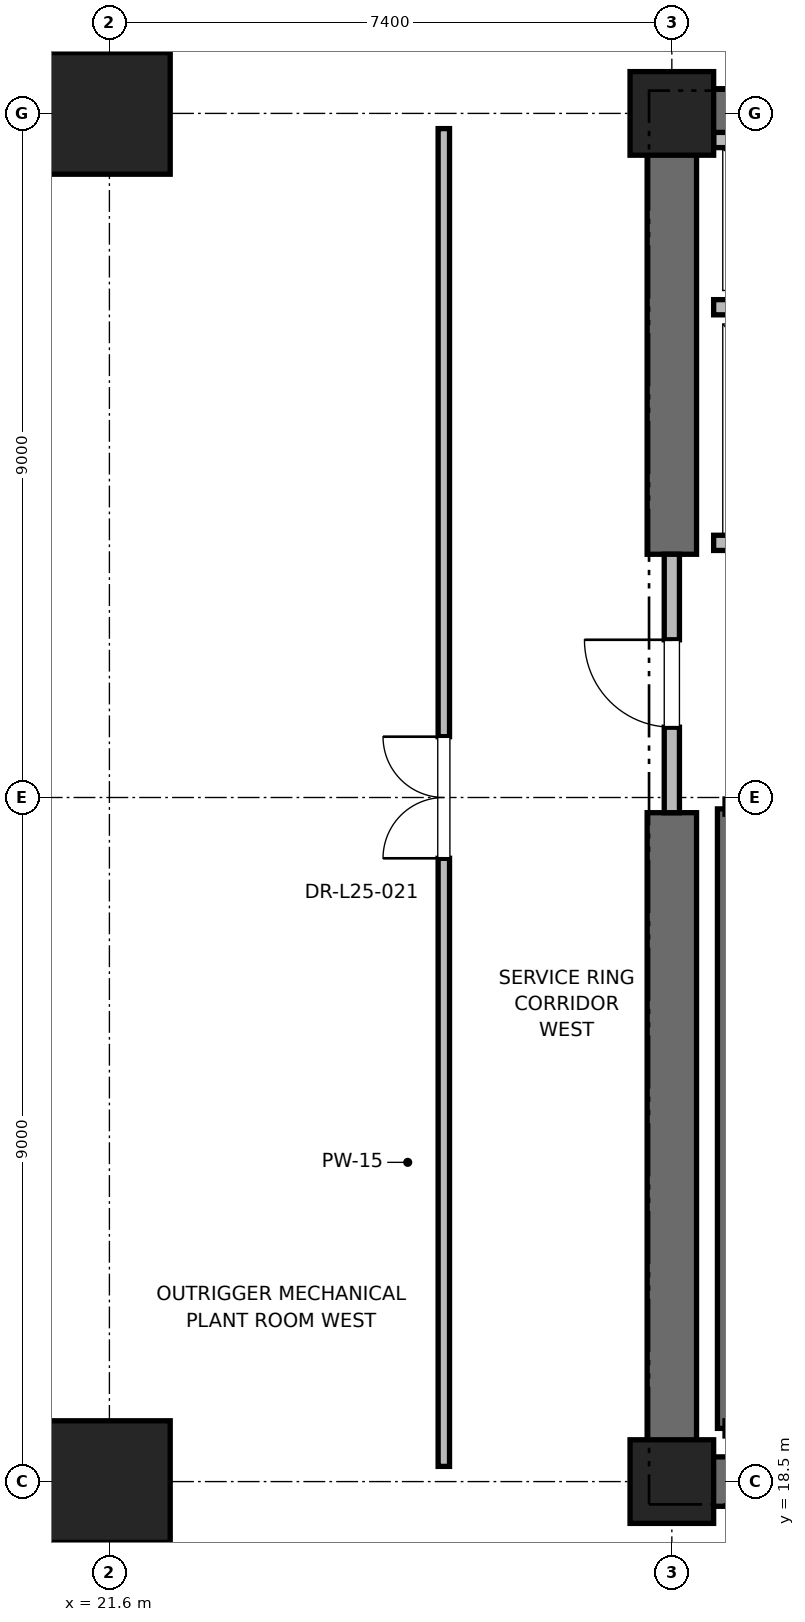
"""IFC4 building model, lengths in metres.
Left out: names, types, materials, properties, quantities, classifications, styles, units other than length and angle.
Written with IfcOpenShell. Run it as: python <this file> out.ifc"""

import sys

from ifc_helpers import new_model, si_unit, direction, frame, frame_2d, origin, origin_2d, place, context, subcontext, project, spatial, rectangle, extrude, element, fill, save


model = new_model("IFC4")
c1 = context("Model", 3, precision=1e-05, world=origin(), true_north=direction((0.0, 1.0)))
c2 = subcontext(c1, "Body", "Model", "MODEL_VIEW")
j1 = project(units=[si_unit("LENGTHUNIT", "METRE"), si_unit("PLANEANGLEUNIT", "RADIAN")], contexts=[c1])
p1 = place(None, origin())
s1 = spatial("IfcSite", under=j1, at=p1, CompositionType="ELEMENT")
p2 = place(p1, origin())
s2 = spatial("IfcBuilding", under=s1, at=p2, CompositionType="ELEMENT")
p3 = place(p2, frame((0.0, 0.0, 107.6)))
s3 = spatial("IfcBuildingStorey", under=s2, at=p3, CompositionType="ELEMENT", Elevation=107.6)
for number, where, z_axis, x_axis in (
    (1, (21.6, 18.5, 0.0), (0.0, 0.0, 1.0), (1.0, 0.0, 0.0)),
    (2, (21.6, 36.5, 0.0), (0.0, 0.0, 1.0), (1.0, 0.0, 0.0)),
):
    element("IfcColumn", number, at=place(p3, frame(where, z_axis=z_axis, x_axis=x_axis)), inside=s3, PredefinedType="COLUMN", context=c2, shape_type="SweptSolid", body=[
        extrude(rectangle(XDim=1.6, YDim=1.6, at=origin_2d()), origin(), (0.0, 0.0, 1.0), 5.4),
    ])
for number, where, z_axis, x_axis in (
    (3, (29.0, 18.5, 0.0), (0.0, 0.0, 1.0), (1.0, 0.0, 0.0)),
    (4, (29.0, 36.5, 0.0), (0.0, 0.0, 1.0), (1.0, 0.0, 0.0)),
):
    element("IfcColumn", number, at=place(p3, frame(where, z_axis=z_axis, x_axis=x_axis)), inside=s3, PredefinedType="PILASTER", context=c2, shape_type="SweptSolid", body=[
        extrude(rectangle(XDim=1.1, YDim=1.1, at=origin_2d()), origin(), (0.0, 0.0, 1.0), 5.4),
    ])
p4 = place(p3, frame((29.0, 18.5, 0.0), z_axis=(0.0, 0.0, 1.0), x_axis=(1.0, 0.0, 0.0)))
e5 = element("IfcWall", 5, at=p4, inside=s3, PredefinedType="SHEAR", context=c2, shape_type="SweptSolid", body=[
    extrude(rectangle(XDim=9.2, YDim=0.65, at=frame_2d((4.6, 0.0))), origin(), (0.0, 0.0, 1.0), 5.1),
])
p5 = place(p3, frame((29.0, 36.5, 0.0), z_axis=(0.0, 0.0, 1.0), x_axis=(1.0, 0.0, 0.0)))
e6 = element("IfcWall", 6, at=p5, inside=s3, PredefinedType="SHEAR", context=c2, shape_type="SweptSolid", body=[
    extrude(rectangle(XDim=5.8, YDim=0.65, at=frame_2d((2.9, 0.0))), origin(), (0.0, 0.0, 1.0), 5.1),
])
p6 = place(p3, frame((29.0, 18.5, 0.0), z_axis=(0.0, 0.0, 1.0), x_axis=(0.0, 1.0, 0.0)))
e7 = element("IfcWall", 7, at=p6, inside=s3, PredefinedType="SHEAR", context=c2, shape_type="SweptSolid", body=[
    extrude(rectangle(XDim=8.8, YDim=0.65, at=frame_2d((4.4, 0.0))), origin(), (0.0, 0.0, 1.0), 5.1),
])
p7 = place(p3, frame((29.0, 30.7, 0.0), z_axis=(0.0, 0.0, 1.0), x_axis=(0.0, 1.0, 0.0)))
e8 = element("IfcWall", 8, at=p7, inside=s3, PredefinedType="SHEAR", context=c2, shape_type="SweptSolid", body=[
    extrude(rectangle(XDim=5.8, YDim=0.65, at=frame_2d((2.9, 0.0))), origin(), (0.0, 0.0, 1.0), 5.1),
])
p8 = place(p3, frame((29.7, 19.2, 0.0), z_axis=(0.0, 0.0, 1.0), x_axis=(0.0, 1.0, 0.0)))
e9 = element("IfcWall", 9, at=p8, inside=s3, PredefinedType="SOLIDWALL", context=c2, shape_type="SweptSolid", body=[
    extrude(rectangle(XDim=8.15, YDim=0.2, at=frame_2d((4.075, 0.0))), origin(), (0.0, 0.0, 1.0), 5.1),
])
p9 = place(p3, frame((29.0, 27.3, 0.0), z_axis=(0.0, 0.0, 1.0), x_axis=(0.0, 1.0, 0.0)))
e10 = element("IfcWall", 10, at=p9, inside=s3, PredefinedType="PARTITIONING", context=c2, shape_type="SweptSolid", body=[
    extrude(rectangle(XDim=3.4, YDim=0.2, at=frame_2d((1.7, 0.0))), origin(), (0.0, 0.0, 1.0), 3.88),
])
p10 = place(p9, frame((1.125, 0.0, 0.0)))
e11 = element("IfcOpeningElement", 11, at=p10, cuts=e10, PredefinedType="OPENING", context=c2, shape_type="SweptSolid", body=[
    extrude(rectangle(XDim=1.15, YDim=2.2, at=frame_2d((0.575, 1.1))), frame((0.0, 0.1, 0.0), z_axis=(0.0, -1.0, 0.0), x_axis=(1.0, 0.0, 0.0)), (0.0, 0.0, 1.0), 0.2),
])
p11 = place(p3, frame((29.55, 30.85, 0.0), z_axis=(0.0, 0.0, 1.0), x_axis=(1.0, 0.0, 0.0)))
e12 = element("IfcWall", 12, at=p11, inside=s3, PredefinedType="SOLIDWALL", context=c2, shape_type="SweptSolid", body=[
    extrude(rectangle(XDim=2.6, YDim=0.2, at=frame_2d((1.3, 0.0))), origin(), (0.0, 0.0, 1.0), 3.88),
])
p12 = place(p11, frame((0.75, 0.0, 0.0)))
e13 = element("IfcOpeningElement", 13, at=p12, cuts=e12, PredefinedType="OPENING", context=c2, shape_type="SweptSolid", body=[
    extrude(rectangle(XDim=1.1, YDim=2.2, at=frame_2d((0.55, 1.1))), frame((0.0, 0.1, 0.0), z_axis=(0.0, -1.0, 0.0), x_axis=(1.0, 0.0, 0.0)), (0.0, 0.0, 1.0), 0.2),
])
p13 = place(p3, frame((29.55, 33.95, 0.0), z_axis=(0.0, 0.0, 1.0), x_axis=(1.0, 0.0, 0.0)))
e14 = element("IfcWall", 14, at=p13, inside=s3, PredefinedType="SOLIDWALL", context=c2, shape_type="SweptSolid", body=[
    extrude(rectangle(XDim=2.8, YDim=0.2, at=frame_2d((1.4, 0.0))), origin(), (0.0, 0.0, 1.0), 5.1),
])
p14 = place(p3, frame((32.35, 36.15, 0.0), z_axis=(0.0, 0.0, 1.0), x_axis=(-1.0, 0.0, 0.0)))
e15 = element("IfcWall", 15, at=p14, inside=s3, PredefinedType="SOLIDWALL", context=c2, shape_type="SweptSolid", body=[
    extrude(rectangle(XDim=2.8, YDim=0.2, at=frame_2d((1.4, 0.0))), origin(), (0.0, 0.0, 1.0), 4.153),
])
p15 = place(p3, frame((26.0, 18.7, 0.0), z_axis=(0.0, 0.0, 1.0), x_axis=(0.0, 1.0, 0.0)))
e16 = element("IfcWall", 16, at=p15, inside=s3, PredefinedType="PARTITIONING", context=c2, shape_type="SweptSolid", body=[
    extrude(rectangle(XDim=17.6, YDim=0.15, at=frame_2d((8.8, 0.0))), origin(), (0.0, 0.0, 1.0), 2.85),
])
p16 = place(p15, frame((8.0, 0.0, 0.0)))
e17 = element("IfcOpeningElement", 17, at=p16, cuts=e16, PredefinedType="OPENING", context=c2, shape_type="SweptSolid", body=[
    extrude(rectangle(XDim=1.6, YDim=2.25, at=frame_2d((0.8, 1.125))), frame((0.0, 0.075, 0.0), z_axis=(0.0, -1.0, 0.0), x_axis=(1.0, 0.0, 0.0)), (0.0, 0.0, 1.0), 0.15),
])
p17 = place(p10, origin())
e18 = element("IfcDoor", 18, at=p17, inside=s3, OperationType="SINGLE_SWING_RIGHT", PredefinedType="DOOR", context=c2, shape_type="SweptSolid", body=[
    extrude(rectangle(XDim=1.15, YDim=2.2, at=frame_2d((0.575, 1.1))), frame((0.0, 0.025, 0.0), z_axis=(0.0, -1.0, 0.0), x_axis=(1.0, 0.0, 0.0)), (0.0, 0.0, 1.0), 0.05),
])
fill(e11, e18)
p18 = place(p16, origin())
e19 = element("IfcDoor", 19, at=p18, inside=s3, OperationType="DOUBLE_DOOR_SINGLE_SWING", PredefinedType="DOOR", context=c2, shape_type="SweptSolid", body=[
    extrude(rectangle(XDim=1.6, YDim=2.25, at=frame_2d((0.8, 1.125))), frame((0.0, 0.025, 0.0), z_axis=(0.0, -1.0, 0.0), x_axis=(1.0, 0.0, 0.0)), (0.0, 0.0, 1.0), 0.05),
])
fill(e17, e19)
save(model, sys.argv[1])
